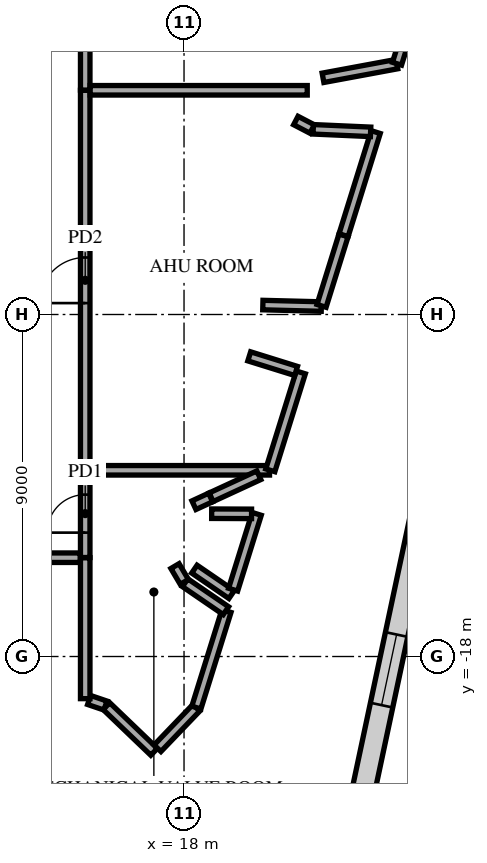
"""IFC4 building model, lengths in metres.
Left out: names, types, materials, properties, quantities, classifications, styles, units other than length and angle.
Written with IfcOpenShell. Run it as: python <this file> out.ifc"""

import sys

from ifc_helpers import new_model, si_unit, direction, frame, frame_2d, origin, place, context, subcontext, project, spatial, rectangle, extrude, element, fill, save


model = new_model("IFC4")
c1 = context("Model", 3, precision=1e-05, world=origin(), true_north=direction((0.0, 1.0)))
c2 = subcontext(c1, "Body", "Model", "MODEL_VIEW")
j1 = project(units=[si_unit("LENGTHUNIT", "METRE"), si_unit("PLANEANGLEUNIT", "RADIAN")], contexts=[c1])
p1 = place(None, origin())
s1 = spatial("IfcSite", under=j1, at=p1, CompositionType="ELEMENT")
p2 = place(p1, origin())
s2 = spatial("IfcBuilding", under=s1, at=p2, CompositionType="ELEMENT")
p3 = place(p2, frame((0.0, 0.0, 344.5)))
s3 = spatial("IfcBuildingStorey", under=s2, at=p3, CompositionType="ELEMENT", Elevation=344.5)
p4 = place(p3, frame((15.958, -19.306, 0.0), z_axis=(0.0, 0.0, 1.0), x_axis=(0.7218419768, -0.692057917034, 0.0)))
e1 = element("IfcWall", 1, at=p4, inside=s3, PredefinedType="PARTITIONING", context=c2, shape_type="SweptSolid", body=[
    extrude(rectangle(XDim=1.738, YDim=0.25, at=frame_2d((0.869, 0.0))), origin(), (0.0, 0.0, 1.0), 5.3),
])
p5 = place(p3, frame((17.302, -20.414, 0.0), z_axis=(0.0, 0.0, 1.0), x_axis=(0.692135440406, 0.721767644145, 0.0)))
e2 = element("IfcWall", 2, at=p5, inside=s3, PredefinedType="PARTITIONING", context=c2, shape_type="SweptSolid", body=[
    extrude(rectangle(XDim=1.475, YDim=0.25, at=frame_2d((0.737, 0.0))), origin(), (0.0, 0.0, 1.0), 5.3),
])
p6 = place(p3, frame((15.503, -19.144, 0.0), z_axis=(0.0, 0.0, 1.0), x_axis=(0.946618463561, -0.322356145351, 0.0)))
e3 = element("IfcWall", 3, at=p6, inside=s3, PredefinedType="PARTITIONING", context=c2, shape_type="SweptSolid", body=[
    extrude(rectangle(XDim=0.454, YDim=0.25, at=frame_2d((0.227, 0.0))), origin(), (0.0, 0.0, 1.0), 5.3),
])
p7 = place(p3, frame((15.4, -19.109, 0.0), z_axis=(0.0, 0.0, 1.0), x_axis=(0.0, 1.0, 0.0)))
e4 = element("IfcWall", 4, at=p7, inside=s3, PredefinedType="PARTITIONING", context=c2, shape_type="SweptSolid", body=[
    extrude(rectangle(XDim=3.709, YDim=0.25, at=frame_2d((1.854, 0.0))), origin(), (0.0, 0.0, 1.0), 5.3),
])
p8 = place(p3, frame((18.325, -19.344, 0.0), z_axis=(0.0, 0.0, 1.0), x_axis=(0.297454932752, 0.95473586032, 0.0)))
e5 = element("IfcWall", 5, at=p8, inside=s3, PredefinedType="PARTITIONING", context=c2, shape_type="SweptSolid", body=[
    extrude(rectangle(XDim=2.662, YDim=0.25, at=frame_2d((1.331, 0.0))), origin(), (0.0, 0.0, 1.0), 5.3),
])
p9 = place(p3, frame((18.273, -15.701, 0.0), z_axis=(0.0, 0.0, 1.0), x_axis=(0.825145635272, -0.564920065665, 0.0)))
e6 = element("IfcWall", 6, at=p9, inside=s3, PredefinedType="PARTITIONING", context=c2, shape_type="SweptSolid", body=[
    extrude(rectangle(XDim=1.186, YDim=0.25, at=frame_2d((0.593, 0.0))), origin(), (0.0, 0.0, 1.0), 5.3),
])
p10 = place(p3, frame((18.028, -16.058, 0.0), z_axis=(0.0, 0.0, 1.0), x_axis=(0.825091021262, -0.564999828878, 0.0)))
e7 = element("IfcWall", 7, at=p10, inside=s3, PredefinedType="PARTITIONING", context=c2, shape_type="SweptSolid", body=[
    extrude(rectangle(XDim=1.302, YDim=0.25, at=frame_2d((0.651, 0.0))), origin(), (0.0, 0.0, 1.0), 5.3),
])
p11 = place(p3, frame((17.762, -15.62, 0.0), z_axis=(0.0, 0.0, 1.0), x_axis=(0.508695307206, -0.860946621125, 0.0)))
e8 = element("IfcWall", 8, at=p11, inside=s3, PredefinedType="PARTITIONING", context=c2, shape_type="SweptSolid", body=[
    extrude(rectangle(XDim=0.484, YDim=0.25, at=frame_2d((0.242, 0.0))), origin(), (0.0, 0.0, 1.0), 5.3),
])
p12 = place(p3, frame((11.512, -15.4, 0.0), z_axis=(0.0, 0.0, 1.0), x_axis=(1.0, 0.0, 0.0)))
e9 = element("IfcWall", 9, at=p12, inside=s3, PredefinedType="PARTITIONING", context=c2, shape_type="SweptSolid", body=[
    extrude(rectangle(XDim=3.758, YDim=0.25, at=frame_2d((1.879, 0.0))), origin(), (0.0, 0.0, 1.0), 4.466),
])
p13 = place(p3, frame((15.4, -15.395, 0.0), z_axis=(0.0, 0.0, 1.0), x_axis=(0.0, 1.0, 0.0)))
e10 = element("IfcWall", 10, at=p13, inside=s3, PredefinedType="PARTITIONING", context=c2, shape_type="SweptSolid", body=[
    extrude(rectangle(XDim=2.295, YDim=0.25, at=frame_2d((1.147, 0.0))), origin(), (0.0, 0.0, 1.0), 4.466),
])
p14 = place(p13, frame((0.655, 0.0, 0.0)))
e11 = element("IfcOpeningElement", 11, at=p14, cuts=e10, PredefinedType="OPENING", context=c2, shape_type="SweptSolid", body=[
    extrude(rectangle(XDim=1.0, YDim=2.1, at=frame_2d((0.5, 1.05))), frame((0.0, 0.135, 0.0), z_axis=(0.0, -1.0, 0.0), x_axis=(1.0, 0.0, 0.0)), (0.0, 0.0, 1.0), 0.27),
])
p15 = place(p3, frame((19.292, -16.241, 0.0), z_axis=(0.0, 0.0, 1.0), x_axis=(0.297582770828, 0.954696022044, 0.0)))
e12 = element("IfcWall", 12, at=p15, inside=s3, PredefinedType="PARTITIONING", context=c2, shape_type="SweptSolid", body=[
    extrude(rectangle(XDim=2.089, YDim=0.25, at=frame_2d((1.044, 0.0))), origin(), (0.0, 0.0, 1.0), 5.3),
])
p16 = place(p3, frame((18.727, -14.242, 0.0), z_axis=(0.0, 0.0, 1.0), x_axis=(0.999993077411, -0.003720904474, 0.0)))
e13 = element("IfcWall", 13, at=p16, inside=s3, PredefinedType="PARTITIONING", context=c2, shape_type="SweptSolid", body=[
    extrude(rectangle(XDim=1.05, YDim=0.25, at=frame_2d((0.525, 0.0))), origin(), (0.0, 0.0, 1.0), 5.3),
])
p17 = place(p3, frame((18.261, -14.018, 0.0), z_axis=(0.0, 0.0, 1.0), x_axis=(0.907737611809, 0.419538351175, 0.0)))
e14 = element("IfcWall", 14, at=p17, inside=s3, PredefinedType="PARTITIONING", context=c2, shape_type="SweptSolid", body=[
    extrude(rectangle(XDim=0.484, YDim=0.25, at=frame_2d((0.242, 0.0))), origin(), (0.0, 0.0, 1.0), 5.3),
])
p18 = place(p3, frame((15.4, -13.095, 0.0), z_axis=(0.0, 0.0, 1.0), x_axis=(0.0, 1.0, 0.0)))
e15 = element("IfcWall", 15, at=p18, inside=s3, PredefinedType="PARTITIONING", context=c2, shape_type="SweptSolid", body=[
    extrude(rectangle(XDim=9.995, YDim=0.25, at=frame_2d((4.998, 0.0))), origin(), (0.0, 0.0, 1.0), 5.3),
])
p19 = place(p18, frame((4.395, 0.0, 0.0)))
e16 = element("IfcOpeningElement", 16, at=p19, cuts=e15, PredefinedType="OPENING", context=c2, shape_type="SweptSolid", body=[
    extrude(rectangle(XDim=1.2, YDim=2.1, at=frame_2d((0.6, 1.05))), frame((0.0, 0.135, 0.0), z_axis=(0.0, -1.0, 0.0), x_axis=(1.0, 0.0, 0.0)), (0.0, 0.0, 1.0), 0.27),
])
p20 = place(p3, frame((15.53, -13.1, 0.0), z_axis=(0.0, 0.0, 1.0), x_axis=(1.0, 0.0, 0.0)))
e17 = element("IfcWall", 17, at=p20, inside=s3, PredefinedType="PARTITIONING", context=c2, shape_type="SweptSolid", body=[
    extrude(rectangle(XDim=4.719, YDim=0.25, at=frame_2d((2.36, 0.0))), origin(), (0.0, 0.0, 1.0), 5.3),
])
p21 = place(p3, frame((18.714, -13.809, 0.0), z_axis=(0.0, 0.0, 1.0), x_axis=(0.907886952758, 0.419215077271, 0.0)))
e18 = element("IfcWall", 18, at=p21, inside=s3, PredefinedType="PARTITIONING", context=c2, shape_type="SweptSolid", body=[
    extrude(rectangle(XDim=1.381, YDim=0.25, at=frame_2d((0.691, 0.0))), origin(), (0.0, 0.0, 1.0), 5.3),
])
p22 = place(p3, frame((20.27, -13.1, 0.0), z_axis=(0.0, 0.0, 1.0), x_axis=(0.297460741613, 0.954734050508, 0.0)))
e19 = element("IfcWall", 19, at=p22, inside=s3, PredefinedType="PARTITIONING", context=c2, shape_type="SweptSolid", body=[
    extrude(rectangle(XDim=2.698, YDim=0.25, at=frame_2d((1.349, 0.0))), origin(), (0.0, 0.0, 1.0), 5.3),
])
p23 = place(p3, frame((19.716, -10.102, 0.0), z_axis=(0.0, 0.0, 1.0), x_axis=(0.954755423217, -0.297392134796, 0.0)))
e20 = element("IfcWall", 20, at=p23, inside=s3, PredefinedType="PARTITIONING", context=c2, shape_type="SweptSolid", body=[
    extrude(rectangle(XDim=1.291, YDim=0.25, at=frame_2d((0.646, 0.0))), origin(), (0.0, 0.0, 1.0), 5.3),
])
p24 = place(p3, frame((20.074, -8.752, 0.0), z_axis=(0.0, 0.0, 1.0), x_axis=(0.999677963181, -0.025376562607, 0.0)))
e21 = element("IfcWall", 21, at=p24, inside=s3, PredefinedType="PARTITIONING", context=c2, shape_type="SweptSolid", body=[
    extrude(rectangle(XDim=1.539, YDim=0.25, at=frame_2d((0.77, 0.0))), origin(), (0.0, 0.0, 1.0), 5.3),
])
p25 = place(p3, frame((21.618, -8.773, 0.0), z_axis=(0.0, 0.0, 1.0), x_axis=(0.297560018368, 0.954703113784, 0.0)))
e22 = element("IfcWall", 22, at=p25, inside=s3, PredefinedType="PARTITIONING", context=c2, shape_type="SweptSolid", body=[
    extrude(rectangle(XDim=1.945, YDim=0.25, at=frame_2d((0.972, 0.0))), origin(), (0.0, 0.0, 1.0), 5.3),
])
p26 = place(p3, frame((22.198, -6.912, 0.0), z_axis=(0.0, 0.0, 1.0), x_axis=(0.29747739365, 0.954728862174, 0.0)))
e23 = element("IfcWall", 23, at=p26, inside=s3, PredefinedType="PARTITIONING", context=c2, shape_type="SweptSolid", body=[
    extrude(rectangle(XDim=2.841, YDim=0.25, at=frame_2d((1.421, 0.0))), origin(), (0.0, 0.0, 1.0), 5.3),
])
p27 = place(p3, frame((21.399, -4.127, 0.0), z_axis=(0.0, 0.0, 1.0), x_axis=(0.999019848314, -0.044264462878, 0.0)))
e24 = element("IfcWall", 24, at=p27, inside=s3, PredefinedType="PARTITIONING", context=c2, shape_type="SweptSolid", body=[
    extrude(rectangle(XDim=1.511, YDim=0.25, at=frame_2d((0.756, 0.0))), origin(), (0.0, 0.0, 1.0), 5.3),
])
p28 = place(p3, frame((20.942, -3.896, 0.0), z_axis=(0.0, 0.0, 1.0), x_axis=(0.886728784224, -0.462290020688, 0.0)))
e25 = element("IfcWall", 25, at=p28, inside=s3, PredefinedType="PARTITIONING", context=c2, shape_type="SweptSolid", body=[
    extrude(rectangle(XDim=0.484, YDim=0.25, at=frame_2d((0.242, 0.0))), origin(), (0.0, 0.0, 1.0), 5.3),
])
p29 = place(p3, frame((15.4, -3.095, 0.0), z_axis=(0.0, 0.0, 1.0), x_axis=(0.0, 1.0, 0.0)))
e26 = element("IfcWall", 26, at=p29, inside=s3, PredefinedType="PARTITIONING", context=c2, shape_type="SweptSolid", body=[
    extrude(rectangle(XDim=9.995, YDim=0.25, at=frame_2d((4.998, 0.0))), origin(), (0.0, 0.0, 1.0), 5.3),
])
p30 = place(p29, frame((4.395, 0.0, 0.0)))
e27 = element("IfcOpeningElement", 27, at=p30, cuts=e26, PredefinedType="OPENING", context=c2, shape_type="SweptSolid", body=[
    extrude(rectangle(XDim=1.2, YDim=2.1, at=frame_2d((0.6, 1.05))), frame((0.0, 0.135, 0.0), z_axis=(0.0, -1.0, 0.0), x_axis=(1.0, 0.0, 0.0)), (0.0, 0.0, 1.0), 0.27),
])
p31 = place(p3, frame((15.53, -3.1, 0.0), z_axis=(0.0, 0.0, 1.0), x_axis=(1.0, 0.0, 0.0)))
e28 = element("IfcWall", 28, at=p31, inside=s3, PredefinedType="PARTITIONING", context=c2, shape_type="SweptSolid", body=[
    extrude(rectangle(XDim=5.712, YDim=0.25, at=frame_2d((2.856, 0.0))), origin(), (0.0, 0.0, 1.0), 4.466),
])
p32 = place(p3, frame((21.657, -2.771, 0.0), z_axis=(0.0, 0.0, 1.0), x_axis=(0.98324759297, 0.182274987092, 0.0)))
e29 = element("IfcWall", 29, at=p32, inside=s3, PredefinedType="PARTITIONING", context=c2, shape_type="SweptSolid", body=[
    extrude(rectangle(XDim=1.977, YDim=0.25, at=frame_2d((0.989, 0.0))), origin(), (0.0, 0.0, 1.0), 5.3),
])
p33 = place(p3, frame((23.604, -2.401, 0.0), z_axis=(0.0, 0.0, 1.0), x_axis=(0.297539238937, 0.954709590029, 0.0)))
e30 = element("IfcWall", 30, at=p33, inside=s3, PredefinedType="PARTITIONING", context=c2, shape_type="SweptSolid", body=[
    extrude(rectangle(XDim=1.946, YDim=0.25, at=frame_2d((0.973, 0.0))), origin(), (0.0, 0.0, 1.0), 5.3),
])
p34 = place(p3, frame((21.129, -29.017, 0.0), z_axis=(0.0, 0.0, 1.0), x_axis=(0.207910119568, 0.978147934712, 0.0)))
e31 = element("IfcWall", 31, at=p34, inside=s3, PredefinedType="STANDARD", context=c2, shape_type="SweptSolid", body=[
    extrude(rectangle(XDim=47.979, YDim=0.6, at=frame_2d((23.99, 0.0))), origin(), (0.0, 0.0, 1.0), 5.3),
])
p35 = place(p34, frame((1.231, 0.0, 0.6)))
e32 = element("IfcOpeningElement", 32, at=p35, cuts=e31, PredefinedType="OPENING", context=c2, shape_type="SweptSolid", body=[
    extrude(rectangle(XDim=1.9, YDim=4.25, at=frame_2d((0.95, 2.125))), frame((0.0, 0.31, 0.0), z_axis=(0.0, -1.0, 0.0), x_axis=(1.0, 0.0, 0.0)), (0.0, 0.0, 1.0), 0.62),
])
p36 = place(p34, frame((5.593, 0.0, 0.6)))
e33 = element("IfcOpeningElement", 33, at=p36, cuts=e31, PredefinedType="OPENING", context=c2, shape_type="SweptSolid", body=[
    extrude(rectangle(XDim=1.9, YDim=4.25, at=frame_2d((0.95, 2.125))), frame((0.0, 0.31, 0.0), z_axis=(0.0, -1.0, 0.0), x_axis=(1.0, 0.0, 0.0)), (0.0, 0.0, 1.0), 0.62),
])
p37 = place(p34, frame((9.954, 0.0, 0.6)))
e34 = element("IfcOpeningElement", 34, at=p37, cuts=e31, PredefinedType="OPENING", context=c2, shape_type="SweptSolid", body=[
    extrude(rectangle(XDim=1.9, YDim=4.25, at=frame_2d((0.95, 2.125))), frame((0.0, 0.31, 0.0), z_axis=(0.0, -1.0, 0.0), x_axis=(1.0, 0.0, 0.0)), (0.0, 0.0, 1.0), 0.62),
])
p38 = place(p34, frame((14.316, 0.0, 0.6)))
e35 = element("IfcOpeningElement", 35, at=p38, cuts=e31, PredefinedType="OPENING", context=c2, shape_type="SweptSolid", body=[
    extrude(rectangle(XDim=1.9, YDim=4.25, at=frame_2d((0.95, 2.125))), frame((0.0, 0.31, 0.0), z_axis=(0.0, -1.0, 0.0), x_axis=(1.0, 0.0, 0.0)), (0.0, 0.0, 1.0), 0.62),
])
p39 = place(p34, frame((18.678, 0.0, 0.6)))
e36 = element("IfcOpeningElement", 36, at=p39, cuts=e31, PredefinedType="OPENING", context=c2, shape_type="SweptSolid", body=[
    extrude(rectangle(XDim=1.9, YDim=4.25, at=frame_2d((0.95, 2.125))), frame((0.0, 0.31, 0.0), z_axis=(0.0, -1.0, 0.0), x_axis=(1.0, 0.0, 0.0)), (0.0, 0.0, 1.0), 0.62),
])
p40 = place(p34, frame((23.04, 0.0, 0.6)))
e37 = element("IfcOpeningElement", 37, at=p40, cuts=e31, PredefinedType="OPENING", context=c2, shape_type="SweptSolid", body=[
    extrude(rectangle(XDim=1.9, YDim=4.25, at=frame_2d((0.95, 2.125))), frame((0.0, 0.31, 0.0), z_axis=(0.0, -1.0, 0.0), x_axis=(1.0, 0.0, 0.0)), (0.0, 0.0, 1.0), 0.62),
])
p41 = place(p34, frame((31.763, 0.0, 0.6)))
e38 = element("IfcOpeningElement", 38, at=p41, cuts=e31, PredefinedType="OPENING", context=c2, shape_type="SweptSolid", body=[
    extrude(rectangle(XDim=1.9, YDim=4.25, at=frame_2d((0.95, 2.125))), frame((0.0, 0.31, 0.0), z_axis=(0.0, -1.0, 0.0), x_axis=(1.0, 0.0, 0.0)), (0.0, 0.0, 1.0), 0.62),
])
p42 = place(p34, frame((36.125, 0.0, 0.6)))
e39 = element("IfcOpeningElement", 39, at=p42, cuts=e31, PredefinedType="OPENING", context=c2, shape_type="SweptSolid", body=[
    extrude(rectangle(XDim=1.9, YDim=4.25, at=frame_2d((0.95, 2.125))), frame((0.0, 0.31, 0.0), z_axis=(0.0, -1.0, 0.0), x_axis=(1.0, 0.0, 0.0)), (0.0, 0.0, 1.0), 0.62),
])
p43 = place(p34, frame((40.487, 0.0, 0.6)))
e40 = element("IfcOpeningElement", 40, at=p43, cuts=e31, PredefinedType="OPENING", context=c2, shape_type="SweptSolid", body=[
    extrude(rectangle(XDim=1.9, YDim=4.25, at=frame_2d((0.95, 2.125))), frame((0.0, 0.31, 0.0), z_axis=(0.0, -1.0, 0.0), x_axis=(1.0, 0.0, 0.0)), (0.0, 0.0, 1.0), 0.62),
])
p44 = place(p34, frame((44.848, 0.0, 0.6)))
e41 = element("IfcOpeningElement", 41, at=p44, cuts=e31, PredefinedType="OPENING", context=c2, shape_type="SweptSolid", body=[
    extrude(rectangle(XDim=1.9, YDim=4.25, at=frame_2d((0.95, 2.125))), frame((0.0, 0.31, 0.0), z_axis=(0.0, -1.0, 0.0), x_axis=(1.0, 0.0, 0.0)), (0.0, 0.0, 1.0), 0.62),
])
p45 = place(p19, origin())
e42 = element("IfcDoor", 42, at=p45, inside=s3, OperationType="SINGLE_SWING_LEFT", PredefinedType="DOOR", context=c2, shape_type="SweptSolid", body=[
    extrude(rectangle(XDim=1.2, YDim=2.1, at=frame_2d((0.6, 1.05))), frame((0.0, 0.025, 0.0), z_axis=(0.0, -1.0, 0.0), x_axis=(1.0, 0.0, 0.0)), (0.0, 0.0, 1.0), 0.05),
])
fill(e16, e42)
p46 = place(p14, origin())
e43 = element("IfcDoor", 43, at=p46, inside=s3, OperationType="SINGLE_SWING_RIGHT", PredefinedType="DOOR", context=c2, shape_type="SweptSolid", body=[
    extrude(rectangle(XDim=1.0, YDim=2.1, at=frame_2d((0.5, 1.05))), frame((0.0, 0.025, 0.0), z_axis=(0.0, -1.0, 0.0), x_axis=(1.0, 0.0, 0.0)), (0.0, 0.0, 1.0), 0.05),
])
fill(e11, e43)
p47 = place(p37, origin())
e44 = element("IfcWindow", 44, at=p47, inside=s3, PartitioningType="SINGLE_PANEL", PredefinedType="USERDEFINED", context=c2, shape_type="SweptSolid", body=[
    extrude(rectangle(XDim=1.9, YDim=4.25, at=frame_2d((0.95, 2.125))), frame((0.0, 0.03, 0.0), z_axis=(0.0, -1.0, 0.0), x_axis=(1.0, 0.0, 0.0)), (0.0, 0.0, 1.0), 0.06),
])
fill(e34, e44)
save(model, sys.argv[1])
